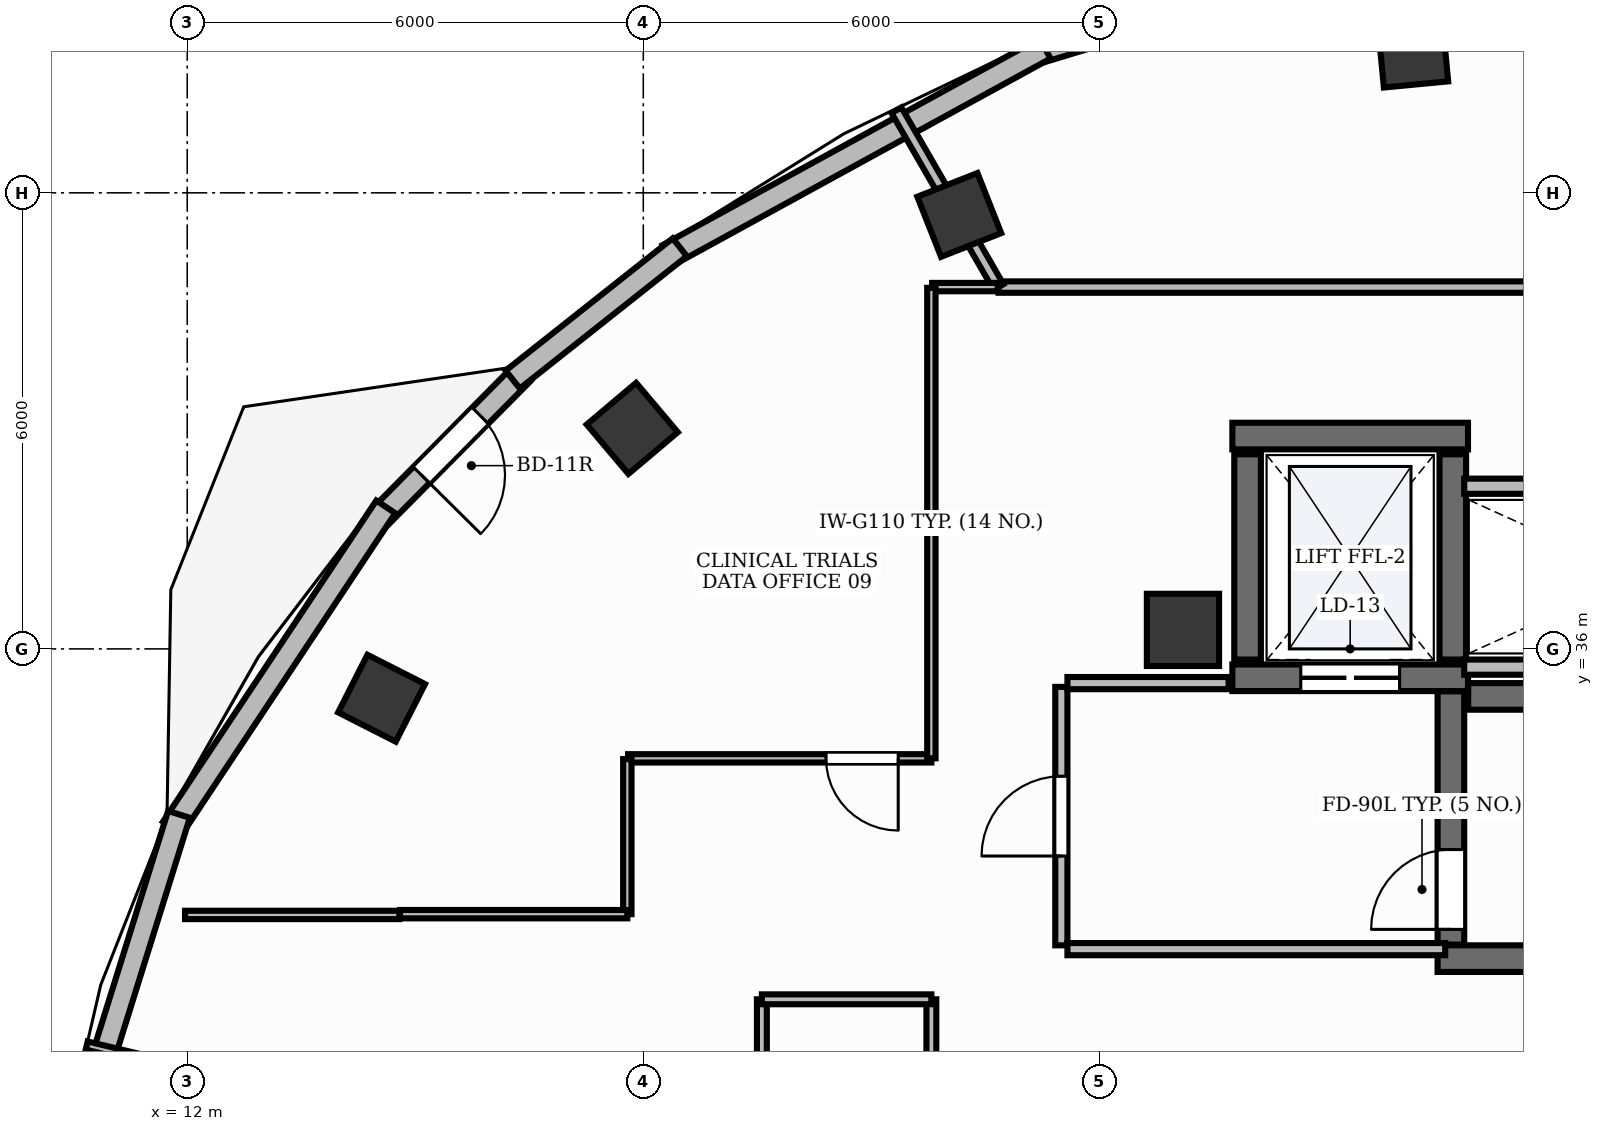
"""IFC4 building model, lengths in metres.
Left out: names, types, materials, properties, quantities, classifications, styles, units other than length and angle.
Written with IfcOpenShell. Run it as: python <this file> out.ifc"""

import sys

from ifc_helpers import new_model, si_unit, direction, frame, frame_2d, origin, origin_2d, place, context, subcontext, project, spatial, rectangle, extrude, element, fill, save


model = new_model("IFC4")
c1 = context("Model", 3, precision=1e-05, world=origin(), true_north=direction((0.0, 1.0)))
c2 = subcontext(c1, "Body", "Model", "MODEL_VIEW")
j1 = project(units=[si_unit("LENGTHUNIT", "METRE"), si_unit("PLANEANGLEUNIT", "RADIAN")], contexts=[c1])
p1 = place(None, origin())
s1 = spatial("IfcSite", under=j1, at=p1, CompositionType="ELEMENT")
p2 = place(p1, origin())
s2 = spatial("IfcBuilding", under=s1, at=p2, CompositionType="ELEMENT")
p3 = place(p2, frame((0.0, 0.0, 286.8)))
s3 = spatial("IfcBuildingStorey", under=s2, at=p3, CompositionType="ELEMENT", Elevation=286.8)
p4 = place(p3, frame((28.852, 35.375, 0.0), z_axis=(0.0, 0.0, 1.0), x_axis=(1.0, 0.0, 0.0)))
e1 = element("IfcWall", 1, at=p4, inside=s3, PredefinedType="SHEAR", context=c2, shape_type="SweptSolid", body=[
    extrude(rectangle(XDim=8.148, YDim=0.35, at=frame_2d((4.074, 0.0))), origin(), (0.0, 0.0, 1.0), 3.9),
])
p5 = place(p3, frame((28.45, 31.925, 0.0), z_axis=(0.0, 0.0, 1.0), x_axis=(1.0, 0.0, 0.0)))
e2 = element("IfcWall", 2, at=p5, inside=s3, PredefinedType="SHEAR", context=c2, shape_type="SweptSolid", body=[
    extrude(rectangle(XDim=8.55, YDim=0.35, at=frame_2d((4.275, 0.0))), origin(), (0.0, 0.0, 1.0), 3.9),
])
p6 = place(p3, frame((28.625, 32.11, 0.0), z_axis=(0.0, 0.0, 1.0), x_axis=(0.0, 1.0, 0.0)))
e3 = element("IfcWall", 3, at=p6, inside=s3, PredefinedType="SHEAR", context=c2, shape_type="SweptSolid", body=[
    extrude(rectangle(XDim=3.333, YDim=0.35, at=frame_2d((1.667, 0.0))), origin(), (0.0, 0.0, 1.0), 3.9),
])
p7 = place(p6, frame((0.2, 0.0, 0.0)))
e4 = element("IfcOpeningElement", 4, at=p7, cuts=e3, PredefinedType="OPENING", context=c2, shape_type="SweptSolid", body=[
    extrude(rectangle(XDim=1.05, YDim=2.15, at=frame_2d((0.525, 1.075))), frame((0.0, 0.19, 0.0), z_axis=(0.0, -1.0, 0.0), x_axis=(1.0, 0.0, 0.0)), (0.0, 0.0, 1.0), 0.38),
])
p8 = place(p3, frame((25.75, 38.8, 0.0), z_axis=(0.0, 0.0, 1.0), x_axis=(1.0, 0.0, 0.0)))
e5 = element("IfcWall", 5, at=p8, inside=s3, PredefinedType="SHEAR", context=c2, shape_type="SweptSolid", body=[
    extrude(rectangle(XDim=3.1, YDim=0.35, at=frame_2d((1.55, 0.0))), origin(), (0.0, 0.0, 1.0), 3.9),
])
p9 = place(p3, frame((25.75, 35.62, 0.0), z_axis=(0.0, 0.0, 1.0), x_axis=(1.0, 0.0, 0.0)))
e6 = element("IfcWall", 6, at=p9, inside=s3, PredefinedType="SHEAR", context=c2, shape_type="SweptSolid", body=[
    extrude(rectangle(XDim=3.1, YDim=0.35, at=frame_2d((1.55, 0.0))), origin(), (0.0, 0.0, 1.0), 3.9),
])
p10 = place(p9, frame((0.9, 0.0, 0.0)))
e7 = element("IfcOpeningElement", 7, at=p10, cuts=e6, PredefinedType="OPENING", context=c2, shape_type="SweptSolid", body=[
    extrude(rectangle(XDim=1.3, YDim=2.2, at=frame_2d((0.65, 1.1))), frame((0.0, 0.19, 0.0), z_axis=(0.0, -1.0, 0.0), x_axis=(1.0, 0.0, 0.0)), (0.0, 0.0, 1.0), 0.38),
])
for number, where, z_axis, x_axis in (
    (8, (25.95, 35.86, 0.0), (0.0, 0.0, 1.0), (0.0, 1.0, 0.0)),
    (9, (28.65, 35.86, 0.0), (0.0, 0.0, 1.0), (0.0, 1.0, 0.0)),
):
    element("IfcWall", number, at=place(p3, frame(where, z_axis=z_axis, x_axis=x_axis)), inside=s3, PredefinedType="SHEAR", context=c2, shape_type="SweptSolid", body=[
        extrude(rectangle(XDim=2.7, YDim=0.35, at=frame_2d((1.35, 0.0))), origin(), (0.0, 0.0, 1.0), 3.9),
    ])
p11 = place(p3, frame((25.1, 36.25, -0.0), z_axis=(0.0, 0.0, 1.0), x_axis=(1.0, 0.0, 0.0)))
e10 = element("IfcColumn", 10, at=p11, inside=s3, PredefinedType="PILASTER", context=c2, shape_type="SweptSolid", body=[
    extrude(rectangle(XDim=0.95, YDim=0.95, at=origin_2d()), origin(), (0.0, 0.0, 1.0), 3.901),
])
for number, where, z_axis, x_axis in (
    (11, (28.126, 43.849, -0.0), (0.0, 0.0, 1.0), (0.995, 0.095, 0.0)),
    (12, (22.157, 41.709, -0.0), (0.0, 0.0, 1.0), (0.93, 0.367, 0.0)),
    (13, (17.855, 38.901, -0.0), (0.0, 0.0, 1.0), (0.764, 0.645, 0.0)),
    (14, (14.557, 35.351, -0.0), (0.0, 0.0, 1.0), (0.453, 0.891, 0.0)),
):
    element("IfcColumn", number, at=place(p3, frame(where, z_axis=z_axis, x_axis=x_axis)), inside=s3, PredefinedType="COLUMN", context=c2, shape_type="SweptSolid", body=[
        extrude(rectangle(XDim=0.85, YDim=0.85, at=origin_2d()), origin(), (0.0, 0.0, 1.0), 3.901),
    ])
p12 = place(p3, frame((16.414, 39.633, 0.0), z_axis=(0.0, 0.0, 1.0), x_axis=(-0.703783131399, -0.710414881572, 0.0)))
e15 = element("IfcWall", 15, at=p12, inside=s3, PredefinedType="STANDARD", context=c2, shape_type="SweptSolid", body=[
    extrude(rectangle(XDim=2.688, YDim=0.3, at=frame_2d((1.344, 0.0))), origin(), (0.0, 0.0, 1.0), 3.47),
])
p13 = place(p12, frame((0.794, 0.0, 0.0)))
e16 = element("IfcOpeningElement", 16, at=p13, cuts=e15, PredefinedType="OPENING", context=c2, shape_type="SweptSolid", body=[
    extrude(rectangle(XDim=1.1, YDim=2.15, at=frame_2d((0.55, 1.075))), frame((0.0, 0.165, 0.0), z_axis=(0.0, -1.0, 0.0), x_axis=(1.0, 0.0, 0.0)), (0.0, 0.0, 1.0), 0.33),
])
p14 = place(p3, frame((28.745, 45.534, 0.0), z_axis=(0.0, 0.0, 1.0), x_axis=(-0.95696124157, -0.290215751008, 0.0)))
e17 = element("IfcWall", 17, at=p14, inside=s3, PredefinedType="STANDARD", context=c2, shape_type="SweptSolid", body=[
    extrude(rectangle(XDim=5.886, YDim=0.3, at=frame_2d((2.943, 0.0))), origin(), (0.0, 0.0, 1.0), 3.9),
])
p15 = place(p3, frame((23.286, 43.898, 0.0), z_axis=(0.0, 0.0, 1.0), x_axis=(-0.877062479499, -0.480376318166, 0.0)))
e18 = element("IfcWall", 18, at=p15, inside=s3, PredefinedType="STANDARD", context=c2, shape_type="SweptSolid", body=[
    extrude(rectangle(XDim=5.654, YDim=0.3, at=frame_2d((2.827, 0.0))), origin(), (0.0, 0.0, 1.0), 3.9),
])
p16 = place(p3, frame((18.48, 41.283, 0.0), z_axis=(0.0, 0.0, 1.0), x_axis=(-0.784028163495, -0.620725252303, 0.0)))
e19 = element("IfcWall", 19, at=p16, inside=s3, PredefinedType="STANDARD", context=c2, shape_type="SweptSolid", body=[
    extrude(rectangle(XDim=2.803, YDim=0.3, at=frame_2d((1.402, 0.0))), origin(), (0.0, 0.0, 1.0), 3.9),
])
p17 = place(p3, frame((14.612, 37.868, 0.0), z_axis=(0.0, 0.0, 1.0), x_axis=(-0.553332864868, -0.832960227536, 0.0)))
e20 = element("IfcWall", 20, at=p17, inside=s3, PredefinedType="STANDARD", context=c2, shape_type="SweptSolid", body=[
    extrude(rectangle(XDim=5.071, YDim=0.3, at=frame_2d((2.535, 0.0))), origin(), (0.0, 0.0, 1.0), 3.47),
])
p18 = place(p3, frame((11.891, 33.823, 0.0), z_axis=(0.0, 0.0, 1.0), x_axis=(-0.297974306034, -0.954573890772, 0.0)))
e21 = element("IfcWall", 21, at=p18, inside=s3, PredefinedType="STANDARD", context=c2, shape_type="SweptSolid", body=[
    extrude(rectangle(XDim=4.854, YDim=0.3, at=frame_2d((2.427, 0.0))), origin(), (0.0, 0.0, 1.0), 3.9),
])
for number, where, z_axis, x_axis in (
    (22, (28.8, 35.76, 0.0), (0.0, 0.0, 1.0), (1.0, 0.0, 0.0)),
    (23, (28.8, 38.14, 0.0), (0.0, 0.0, 1.0), (1.0, 0.0, 0.0)),
):
    element("IfcWall", number, at=place(p3, frame(where, z_axis=z_axis, x_axis=x_axis)), inside=s3, PredefinedType="PARTITIONING", context=c2, shape_type="SweptSolid", body=[
        extrude(rectangle(XDim=4.57, YDim=0.2, at=frame_2d((2.285, 0.0))), origin(), (0.0, 0.0, 1.0), 2.22),
    ])
p19 = place(p3, frame((23.5, 32.1, 0.0), z_axis=(0.0, 0.0, 1.0), x_axis=(0.0, 1.0, 0.0)))
e24 = element("IfcWall", 24, at=p19, inside=s3, PredefinedType="PARTITIONING", context=c2, shape_type="SweptSolid", body=[
    extrude(rectangle(XDim=3.4, YDim=0.16, at=frame_2d((1.7, 0.0))), origin(), (0.0, 0.0, 1.0), 2.22),
])
p20 = place(p19, frame((1.175, 0.0, 0.0)))
e25 = element("IfcOpeningElement", 25, at=p20, cuts=e24, PredefinedType="OPENING", context=c2, shape_type="SweptSolid", body=[
    extrude(rectangle(XDim=1.05, YDim=2.15, at=frame_2d((0.525, 1.075))), frame((0.0, 0.095, 0.0), z_axis=(0.0, -1.0, 0.0), x_axis=(1.0, 0.0, 0.0)), (0.0, 0.0, 1.0), 0.19),
])
p21 = place(p3, frame((23.58, 32.05, 0.0), z_axis=(0.0, 0.0, 1.0), x_axis=(1.0, 0.0, 0.0)))
e26 = element("IfcWall", 26, at=p21, inside=s3, PredefinedType="PARTITIONING", context=c2, shape_type="SweptSolid", body=[
    extrude(rectangle(XDim=4.97, YDim=0.16, at=frame_2d((2.485, 0.0))), origin(), (0.0, 0.0, 1.0), 2.22),
])
p22 = place(p3, frame((23.58, 35.55, 0.0), z_axis=(0.0, 0.0, 1.0), x_axis=(1.0, 0.0, 0.0)))
e27 = element("IfcWall", 27, at=p22, inside=s3, PredefinedType="PARTITIONING", context=c2, shape_type="SweptSolid", body=[
    extrude(rectangle(XDim=2.12, YDim=0.16, at=frame_2d((1.06, 0.0))), origin(), (0.0, 0.0, 1.0), 2.22),
])
p23 = place(p3, frame((21.79, 31.39, 0.0), z_axis=(0.0, 0.0, 1.0), x_axis=(0.0, -1.0, 0.0)))
e28 = element("IfcWall", 28, at=p23, inside=s3, PredefinedType="PARTITIONING", context=c2, shape_type="SweptSolid", body=[
    extrude(rectangle(XDim=4.29, YDim=0.13, at=frame_2d((2.145, 0.0))), origin(), (0.0, 0.0, 1.0), 2.22),
])
p24 = place(p23, frame((3.15, 0.0, 0.0)))
e29 = element("IfcOpeningElement", 29, at=p24, cuts=e28, PredefinedType="OPENING", context=c2, shape_type="SweptSolid", body=[
    extrude(rectangle(XDim=0.9, YDim=2.15, at=frame_2d((0.45, 1.075))), frame((0.0, 0.08, 0.0), z_axis=(0.0, -1.0, 0.0), x_axis=(1.0, 0.0, 0.0)), (0.0, 0.0, 1.0), 0.16),
])
p25 = place(p3, frame((32.8, 40.76, 0.0), z_axis=(0.0, 0.0, 1.0), x_axis=(-1.0, 0.0, 0.0)))
e30 = element("IfcWall", 30, at=p25, inside=s3, PredefinedType="PARTITIONING", context=c2, shape_type="SweptSolid", body=[
    extrude(rectangle(XDim=10.126, YDim=0.15, at=frame_2d((5.063, 0.0))), origin(), (0.0, 0.0, 1.0), 2.22),
])
p26 = place(p25, frame((0.24, 0.0, 0.0)))
e31 = element("IfcOpeningElement", 31, at=p26, cuts=e30, PredefinedType="OPENING", context=c2, shape_type="SweptSolid", body=[
    extrude(rectangle(XDim=0.95, YDim=2.15, at=frame_2d((0.475, 1.075))), frame((0.0, 0.09, 0.0), z_axis=(0.0, -1.0, 0.0), x_axis=(1.0, 0.0, 0.0)), (0.0, 0.0, 1.0), 0.18),
])
p27 = place(p3, frame((21.79, 34.56, 0.0), z_axis=(0.0, 0.0, 1.0), x_axis=(-1.0, 0.0, 0.0)))
e32 = element("IfcWall", 32, at=p27, inside=s3, PredefinedType="MOVABLE", context=c2, shape_type="SweptSolid", body=[
    extrude(rectangle(XDim=3.99, YDim=0.11, at=frame_2d((1.995, 0.0))), origin(), (0.0, 0.0, 1.0), 2.22),
])
p28 = place(p27, frame((0.436, 0.0, 0.0)))
e33 = element("IfcOpeningElement", 33, at=p28, cuts=e32, PredefinedType="OPENING", context=c2, shape_type="SweptSolid", body=[
    extrude(rectangle(XDim=0.95, YDim=2.15, at=frame_2d((0.475, 1.075))), frame((0.0, 0.07, 0.0), z_axis=(0.0, -1.0, 0.0), x_axis=(1.0, 0.0, 0.0)), (0.0, 0.0, 1.0), 0.14),
])
p29 = place(p3, frame((19.56, 29.8, 0.0), z_axis=(0.0, 0.0, 1.0), x_axis=(0.0, 1.0, 0.0)))
e34 = element("IfcWall", 34, at=p29, inside=s3, PredefinedType="PARTITIONING", context=c2, shape_type="SweptSolid", body=[
    extrude(rectangle(XDim=1.59, YDim=0.13, at=frame_2d((0.795, 0.0))), origin(), (0.0, 0.0, 1.0), 2.22),
])
p30 = place(p3, frame((19.56, 31.39, 0.0), z_axis=(0.0, 0.0, 1.0), x_axis=(1.0, 0.0, 0.0)))
e35 = element("IfcWall", 35, at=p30, inside=s3, PredefinedType="PARTITIONING", context=c2, shape_type="SweptSolid", body=[
    extrude(rectangle(XDim=2.23, YDim=0.13, at=frame_2d((1.115, 0.0))), origin(), (0.0, 0.0, 1.0), 2.22),
])
p31 = place(p3, frame((10.677, 30.781, 0.0), z_axis=(0.0, 0.0, 1.0), x_axis=(0.972691489336, -0.232101845262, 0.0)))
e36 = element("IfcWall", 36, at=p31, inside=s3, PredefinedType="MOVABLE", context=c2, shape_type="SweptSolid", body=[
    extrude(rectangle(XDim=4.229, YDim=0.11, at=frame_2d((2.114, 0.0))), origin(), (0.0, 0.0, 1.0), 2.22),
])
p32 = place(p3, frame((22.674, 40.76, 0.0), z_axis=(0.0, 0.0, 1.0), x_axis=(-0.500068617113, 0.865985784051, 0.0)))
e37 = element("IfcWall", 37, at=p32, inside=s3, PredefinedType="PARTITIONING", context=c2, shape_type="SweptSolid", body=[
    extrude(rectangle(XDim=2.686, YDim=0.15, at=frame_2d((1.343, 0.0))), origin(), (0.0, 0.0, 1.0), 2.22),
])
p33 = place(p3, frame((22.662, 40.76, 0.0), z_axis=(0.0, 0.0, 1.0), x_axis=(-1.0, 0.0, 0.0)))
e38 = element("IfcWall", 38, at=p33, inside=s3, PredefinedType="MOVABLE", context=c2, shape_type="SweptSolid", body=[
    extrude(rectangle(XDim=0.862, YDim=0.11, at=frame_2d((0.431, 0.0))), origin(), (0.0, 0.0, 1.0), 2.22),
])
p34 = place(p3, frame((21.79, 40.75, 0.0), z_axis=(0.0, 0.0, 1.0), x_axis=(0.0, -1.0, 0.0)))
e39 = element("IfcWall", 39, at=p34, inside=s3, PredefinedType="MOVABLE", context=c2, shape_type="SweptSolid", body=[
    extrude(rectangle(XDim=6.19, YDim=0.11, at=frame_2d((3.095, 0.0))), origin(), (0.0, 0.0, 1.0), 2.22),
])
p35 = place(p3, frame((17.79, 34.55, 0.0), z_axis=(0.0, 0.0, 1.0), x_axis=(0.0, -1.0, 0.0)))
e40 = element("IfcWall", 40, at=p35, inside=s3, PredefinedType="MOVABLE", context=c2, shape_type="SweptSolid", body=[
    extrude(rectangle(XDim=2.04, YDim=0.11, at=frame_2d((1.02, 0.0))), origin(), (0.0, 0.0, 1.0), 2.22),
])
p36 = place(p3, frame((17.79, 32.51, 0.0), z_axis=(0.0, 0.0, 1.0), x_axis=(-1.0, 0.0, 0.0)))
e41 = element("IfcWall", 41, at=p36, inside=s3, PredefinedType="MOVABLE", context=c2, shape_type="SweptSolid", body=[
    extrude(rectangle(XDim=2.99, YDim=0.11, at=frame_2d((1.495, 0.0))), origin(), (0.0, 0.0, 1.0), 2.22),
])
p37 = place(p3, frame((14.79, 32.5, 0.0), z_axis=(0.0, 0.0, 1.0), x_axis=(-1.0, 0.0, 0.0)))
e42 = element("IfcWall", 42, at=p37, inside=s3, PredefinedType="MOVABLE", context=c2, shape_type="SweptSolid", body=[
    extrude(rectangle(XDim=2.819, YDim=0.11, at=frame_2d((1.409, 0.0))), origin(), (0.0, 0.0, 1.0), 2.22),
])
p38 = place(p13, origin())
e43 = element("IfcDoor", 43, at=p38, inside=s3, OperationType="SINGLE_SWING_RIGHT", PredefinedType="DOOR", context=c2, shape_type="SweptSolid", body=[
    extrude(rectangle(XDim=1.1, YDim=2.15, at=frame_2d((0.55, 1.075))), frame((0.0, 0.025, 0.0), z_axis=(0.0, -1.0, 0.0), x_axis=(1.0, 0.0, 0.0)), (0.0, 0.0, 1.0), 0.05),
])
fill(e16, e43)
p39 = place(p7, origin())
e44 = element("IfcDoor", 44, at=p39, inside=s3, OperationType="SINGLE_SWING_LEFT", PredefinedType="DOOR", context=c2, shape_type="SweptSolid", body=[
    extrude(rectangle(XDim=1.05, YDim=2.15, at=frame_2d((0.525, 1.075))), frame((0.0, 0.025, 0.0), z_axis=(0.0, -1.0, 0.0), x_axis=(1.0, 0.0, 0.0)), (0.0, 0.0, 1.0), 0.05),
])
fill(e4, e44)
p40 = place(p10, origin())
e45 = element("IfcDoor", 45, at=p40, inside=s3, OperationType="DOUBLE_DOOR_SLIDING", PredefinedType="DOOR", context=c2, shape_type="SweptSolid", body=[
    extrude(rectangle(XDim=1.3, YDim=2.2, at=frame_2d((0.65, 1.1))), frame((0.0, 0.025, 0.0), z_axis=(0.0, -1.0, 0.0), x_axis=(1.0, 0.0, 0.0)), (0.0, 0.0, 1.0), 0.05),
])
fill(e7, e45)
p41 = place(p20, origin())
e46 = element("IfcDoor", 46, at=p41, inside=s3, OperationType="SINGLE_SWING_LEFT", PredefinedType="DOOR", context=c2, shape_type="SweptSolid", body=[
    extrude(rectangle(XDim=1.05, YDim=2.15, at=frame_2d((0.525, 1.075))), frame((0.0, 0.025, 0.0), z_axis=(0.0, -1.0, 0.0), x_axis=(1.0, 0.0, 0.0)), (0.0, 0.0, 1.0), 0.05),
])
fill(e25, e46)
p42 = place(p28, origin())
e47 = element("IfcDoor", 47, at=p42, inside=s3, OperationType="SINGLE_SWING_LEFT", PredefinedType="DOOR", context=c2, shape_type="SweptSolid", body=[
    extrude(rectangle(XDim=0.95, YDim=2.15, at=frame_2d((0.475, 1.075))), frame((0.0, 0.025, 0.0), z_axis=(0.0, -1.0, 0.0), x_axis=(1.0, 0.0, 0.0)), (0.0, 0.0, 1.0), 0.05),
])
fill(e33, e47)
save(model, sys.argv[1])
